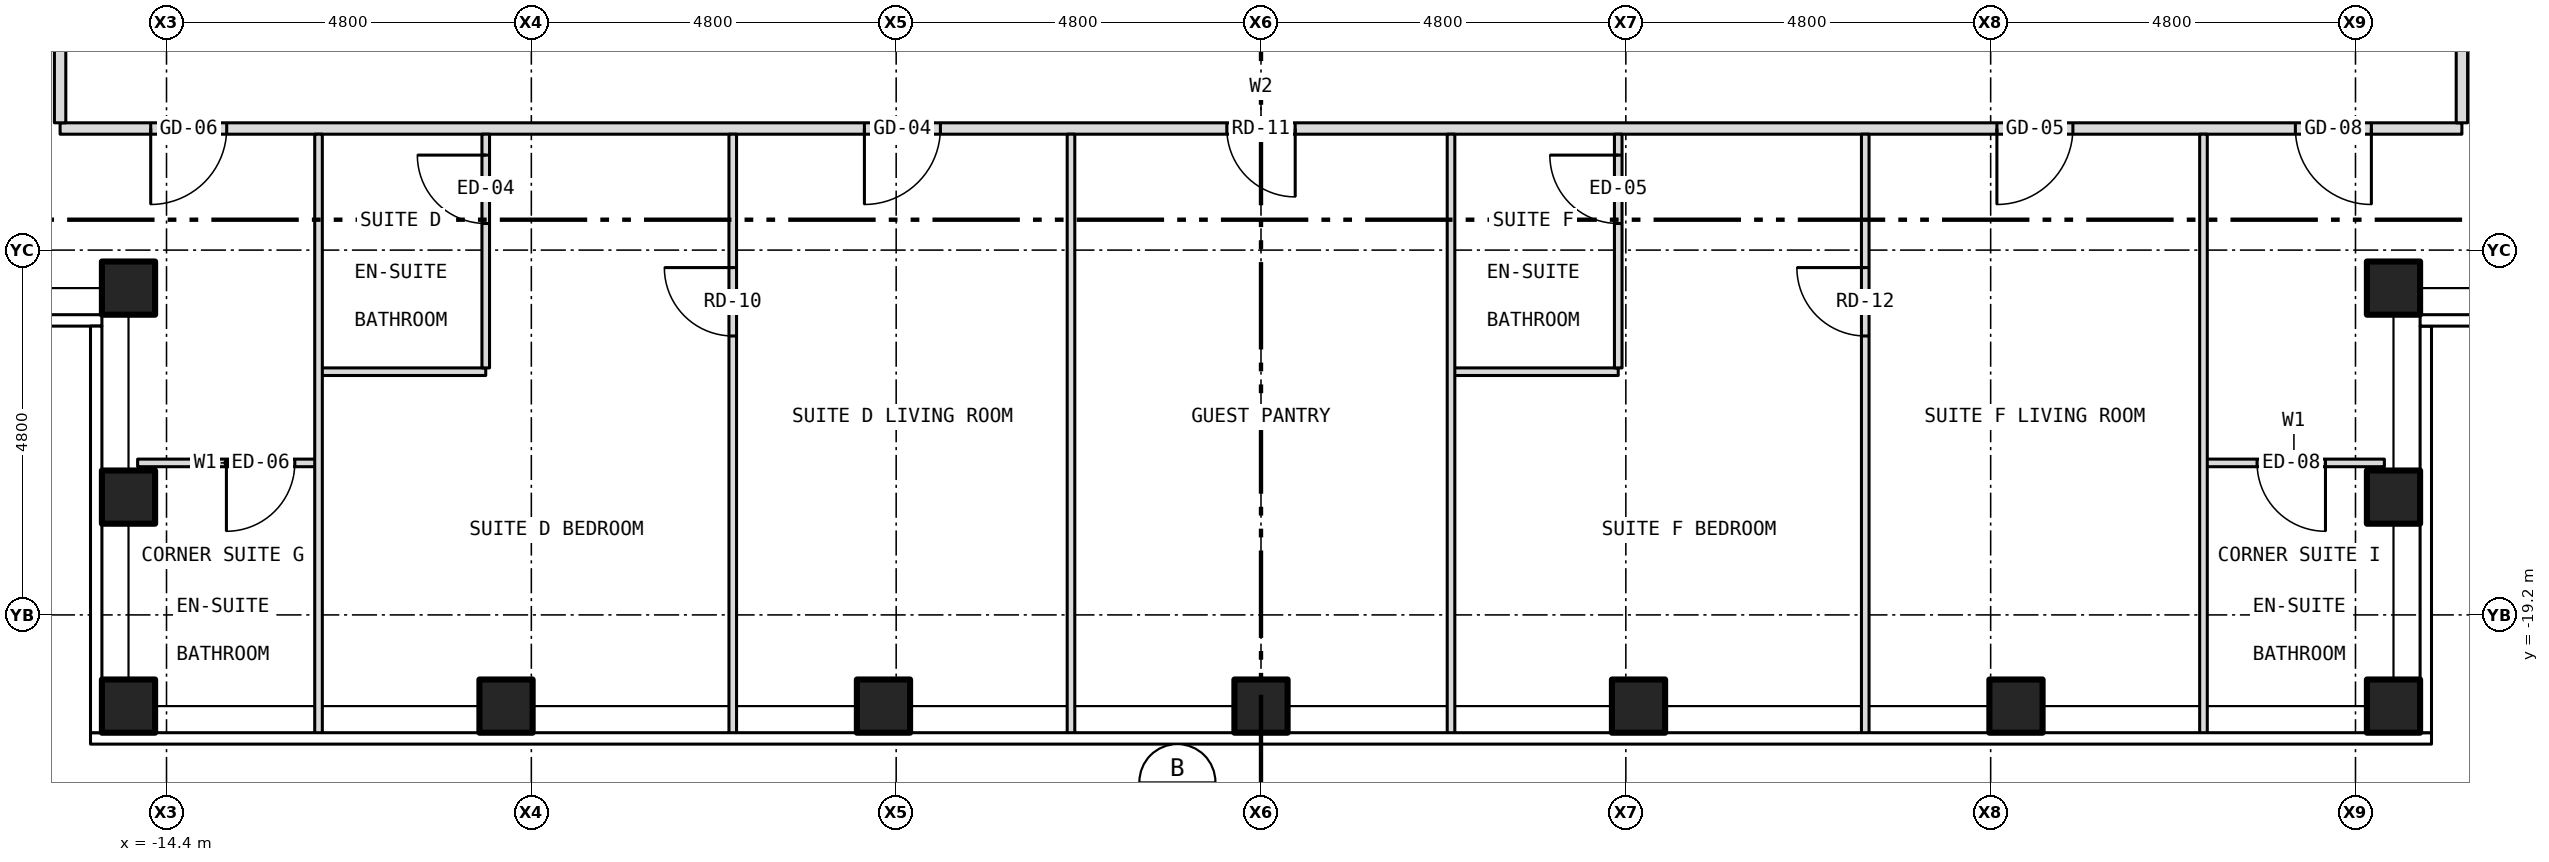
"""IFC4 building model, lengths in metres.
Left out: names, types, materials, properties, quantities, classifications, styles, units other than length and angle.
Written with IfcOpenShell. Run it as: python <this file> out.ifc"""

import sys

from ifc_helpers import new_model, si_unit, direction, frame, frame_2d, origin, origin_2d, place, context, subcontext, project, spatial, rectangle, hollow_rectangle, extrude, element, fill, save


model = new_model("IFC4")
c1 = context("Model", 3, precision=1e-05, world=origin(), true_north=direction((0.0, 1.0)))
c2 = subcontext(c1, "Body", "Model", "MODEL_VIEW")
j1 = project(units=[si_unit("LENGTHUNIT", "METRE"), si_unit("PLANEANGLEUNIT", "RADIAN")], contexts=[c1])
p1 = place(None, origin())
s1 = spatial("IfcSite", under=j1, at=p1, CompositionType="ELEMENT")
p2 = place(p1, origin())
s2 = spatial("IfcBuilding", under=s1, at=p2, CompositionType="ELEMENT")
p3 = place(p2, frame((0.0, 0.0, 194.5)))
s3 = spatial("IfcBuildingStorey", under=s2, at=p3, CompositionType="ELEMENT", Elevation=194.5)
for number, where, z_axis, x_axis in (
    (1, (-14.9, -20.4, -0.15), (0.0, 0.0, 1.0), (1.0, 0.0, 0.0)),
    (2, (-9.933, -20.4, -0.15), (0.0, 0.0, 1.0), (1.0, 0.0, 0.0)),
    (3, (-4.967, -20.4, -0.15), (0.0, 0.0, 1.0), (1.0, 0.0, 0.0)),
    (4, (0.0, -20.4, -0.15), (0.0, 0.0, 1.0), (1.0, 0.0, 0.0)),
    (5, (4.967, -20.4, -0.15), (0.0, 0.0, 1.0), (1.0, 0.0, 0.0)),
    (6, (9.933, -20.4, -0.15), (0.0, 0.0, 1.0), (1.0, 0.0, 0.0)),
    (7, (14.9, -20.4, -0.15), (0.0, 0.0, 1.0), (1.0, 0.0, 0.0)),
    (8, (-14.9, -14.9, -0.15), (0.0, 0.0, 1.0), (1.0, 0.0, 0.0)),
    (9, (-14.9, -17.65, -0.15), (0.0, 0.0, 1.0), (1.0, 0.0, 0.0)),
    (10, (14.9, -14.9, -0.15), (0.0, 0.0, 1.0), (1.0, 0.0, 0.0)),
    (11, (14.9, -17.65, -0.15), (0.0, 0.0, 1.0), (1.0, 0.0, 0.0)),
):
    element("IfcColumn", number, at=place(p3, frame(where, z_axis=z_axis, x_axis=x_axis)), inside=s3, PredefinedType="COLUMN", context=c2, shape_type="SweptSolid", body=[
        extrude(hollow_rectangle(XDim=0.7, YDim=0.7, WallThickness=0.04, at=origin_2d()), origin(), (0.0, 0.0, 1.0), 3.5),
    ])
p4 = place(p3, frame((-14.78, -17.2, 0.0), z_axis=(0.0, 0.0, 1.0), x_axis=(1.0, 0.0, 0.0)))
e12 = element("IfcWall", 12, at=p4, inside=s3, PredefinedType="PARTITIONING", context=c2, shape_type="SweptSolid", body=[
    extrude(rectangle(XDim=2.38, YDim=0.1, at=frame_2d((1.19, 0.0))), origin(), (0.0, 0.0, 1.0), 3.35),
])
p5 = place(p4, frame((1.168, 0.0, 0.0)))
e13 = element("IfcOpeningElement", 13, at=p5, cuts=e12, PredefinedType="OPENING", context=c2, shape_type="SweptSolid", body=[
    extrude(rectangle(XDim=0.9, YDim=2.1, at=frame_2d((0.45, 1.05))), frame((0.0, 0.062, 0.0), z_axis=(0.0, -1.0, 0.0), x_axis=(1.0, 0.0, 0.0)), (0.0, 0.0, 1.0), 0.124),
])
p6 = place(p3, frame((12.4, -17.2, 0.0), z_axis=(0.0, 0.0, 1.0), x_axis=(1.0, 0.0, 0.0)))
e14 = element("IfcWall", 14, at=p6, inside=s3, PredefinedType="PARTITIONING", context=c2, shape_type="SweptSolid", body=[
    extrude(rectangle(XDim=2.38, YDim=0.1, at=frame_2d((1.19, 0.0))), origin(), (0.0, 0.0, 1.0), 3.35),
])
p7 = place(p6, frame((0.705, 0.0, 0.0)))
e15 = element("IfcOpeningElement", 15, at=p7, cuts=e14, PredefinedType="OPENING", context=c2, shape_type="SweptSolid", body=[
    extrude(rectangle(XDim=0.9, YDim=2.1, at=frame_2d((0.45, 1.05))), frame((0.0, 0.062, 0.0), z_axis=(0.0, -1.0, 0.0), x_axis=(1.0, 0.0, 0.0)), (0.0, 0.0, 1.0), 0.124),
])
for number, where, z_axis, x_axis in (
    (16, (-12.4, -16.0, 0.0), (0.0, 0.0, 1.0), (1.0, 0.0, 0.0)),
    (17, (2.5, -16.0, 0.0), (0.0, 0.0, 1.0), (1.0, 0.0, 0.0)),
):
    element("IfcWall", number, at=place(p3, frame(where, z_axis=z_axis, x_axis=x_axis)), inside=s3, PredefinedType="PARTITIONING", context=c2, shape_type="SweptSolid", body=[
        extrude(rectangle(XDim=2.2, YDim=0.1, at=frame_2d((1.1, 0.0))), origin(), (0.0, 0.0, 1.0), 3.35),
    ])
p8 = place(p3, frame((-15.8, -12.8, 0.0), z_axis=(0.0, 0.0, 1.0), x_axis=(1.0, 0.0, 0.0)))
e18 = element("IfcWall", 18, at=p8, inside=s3, PredefinedType="PARTITIONING", context=c2, shape_type="SweptSolid", body=[
    extrude(rectangle(XDim=31.6, YDim=0.15, at=frame_2d((15.8, 0.0))), origin(), (0.0, 0.0, 1.0), 3.35),
])
p9 = place(p8, frame((10.582, 0.0, 0.0)))
e19 = element("IfcOpeningElement", 19, at=p9, cuts=e18, PredefinedType="OPENING", context=c2, shape_type="SweptSolid", body=[
    extrude(rectangle(XDim=1.0, YDim=2.1, at=frame_2d((0.5, 1.05))), frame((0.0, 0.087, 0.0), z_axis=(0.0, -1.0, 0.0), x_axis=(1.0, 0.0, 0.0)), (0.0, 0.0, 1.0), 0.174),
])
p10 = place(p8, frame((15.35, 0.0, 0.0)))
e20 = element("IfcOpeningElement", 20, at=p10, cuts=e18, PredefinedType="OPENING", context=c2, shape_type="SweptSolid", body=[
    extrude(rectangle(XDim=0.9, YDim=2.1, at=frame_2d((0.45, 1.05))), frame((0.0, 0.087, 0.0), z_axis=(0.0, -1.0, 0.0), x_axis=(1.0, 0.0, 0.0)), (0.0, 0.0, 1.0), 0.174),
])
p11 = place(p8, frame((25.482, 0.0, 0.0)))
e21 = element("IfcOpeningElement", 21, at=p11, cuts=e18, PredefinedType="OPENING", context=c2, shape_type="SweptSolid", body=[
    extrude(rectangle(XDim=1.0, YDim=2.1, at=frame_2d((0.5, 1.05))), frame((0.0, 0.087, 0.0), z_axis=(0.0, -1.0, 0.0), x_axis=(1.0, 0.0, 0.0)), (0.0, 0.0, 1.0), 0.174),
])
p12 = place(p8, frame((1.192, 0.0, 0.0)))
e22 = element("IfcOpeningElement", 22, at=p12, cuts=e18, PredefinedType="OPENING", context=c2, shape_type="SweptSolid", body=[
    extrude(rectangle(XDim=1.0, YDim=2.1, at=frame_2d((0.5, 1.05))), frame((0.0, 0.087, 0.0), z_axis=(0.0, -1.0, 0.0), x_axis=(1.0, 0.0, 0.0)), (0.0, 0.0, 1.0), 0.174),
])
p13 = place(p8, frame((29.409, 0.0, 0.0)))
e23 = element("IfcOpeningElement", 23, at=p13, cuts=e18, PredefinedType="OPENING", context=c2, shape_type="SweptSolid", body=[
    extrude(rectangle(XDim=1.0, YDim=2.1, at=frame_2d((0.5, 1.05))), frame((0.0, 0.087, 0.0), z_axis=(0.0, -1.0, 0.0), x_axis=(1.0, 0.0, 0.0)), (0.0, 0.0, 1.0), 0.174),
])
p14 = place(p3, frame((-15.8, -12.725, 0.0), z_axis=(0.0, 0.0, 1.0), x_axis=(0.0, 1.0, 0.0)))
e24 = element("IfcWall", 24, at=p14, inside=s3, PredefinedType="PARTITIONING", context=c2, shape_type="SweptSolid", body=[
    extrude(rectangle(XDim=1.805, YDim=0.15, at=frame_2d((0.903, 0.0))), origin(), (0.0, 0.0, 1.0), 3.35),
])
p15 = place(p3, frame((-12.4, -20.78, 0.0), z_axis=(0.0, 0.0, 1.0), x_axis=(0.0, 1.0, 0.0)))
e25 = element("IfcWall", 25, at=p15, inside=s3, PredefinedType="PARTITIONING", context=c2, shape_type="SweptSolid", body=[
    extrude(rectangle(XDim=7.905, YDim=0.1, at=frame_2d((3.953, 0.0))), origin(), (0.0, 0.0, 1.0), 3.35),
])
p16 = place(p3, frame((-10.2, -15.95, 0.0), z_axis=(0.0, 0.0, 1.0), x_axis=(0.0, 1.0, 0.0)))
e26 = element("IfcWall", 26, at=p16, inside=s3, PredefinedType="PARTITIONING", context=c2, shape_type="SweptSolid", body=[
    extrude(rectangle(XDim=3.075, YDim=0.1, at=frame_2d((1.538, 0.0))), origin(), (0.0, 0.0, 1.0), 3.35),
])
p17 = place(p16, frame((1.9, 0.0, 0.0)))
e27 = element("IfcOpeningElement", 27, at=p17, cuts=e26, PredefinedType="OPENING", context=c2, shape_type="SweptSolid", body=[
    extrude(rectangle(XDim=0.9, YDim=2.1, at=frame_2d((0.45, 1.05))), frame((0.0, 0.062, 0.0), z_axis=(0.0, -1.0, 0.0), x_axis=(1.0, 0.0, 0.0)), (0.0, 0.0, 1.0), 0.124),
])
p18 = place(p3, frame((-6.95, -20.78, 0.0), z_axis=(0.0, 0.0, 1.0), x_axis=(0.0, 1.0, 0.0)))
e28 = element("IfcWall", 28, at=p18, inside=s3, PredefinedType="PARTITIONING", context=c2, shape_type="SweptSolid", body=[
    extrude(rectangle(XDim=7.905, YDim=0.1, at=frame_2d((3.953, 0.0))), origin(), (0.0, 0.0, 1.0), 3.35),
])
p19 = place(p18, frame((5.25, 0.0, 0.0)))
e29 = element("IfcOpeningElement", 29, at=p19, cuts=e28, PredefinedType="OPENING", context=c2, shape_type="SweptSolid", body=[
    extrude(rectangle(XDim=0.9, YDim=2.1, at=frame_2d((0.45, 1.05))), frame((0.0, 0.062, 0.0), z_axis=(0.0, -1.0, 0.0), x_axis=(1.0, 0.0, 0.0)), (0.0, 0.0, 1.0), 0.124),
])
for number, where, z_axis, x_axis in (
    (30, (-2.5, -20.78, 0.0), (0.0, 0.0, 1.0), (0.0, 1.0, 0.0)),
    (31, (2.5, -20.78, 0.0), (0.0, 0.0, 1.0), (0.0, 1.0, 0.0)),
):
    element("IfcWall", number, at=place(p3, frame(where, z_axis=z_axis, x_axis=x_axis)), inside=s3, PredefinedType="PARTITIONING", context=c2, shape_type="SweptSolid", body=[
        extrude(rectangle(XDim=7.905, YDim=0.1, at=frame_2d((3.953, 0.0))), origin(), (0.0, 0.0, 1.0), 3.35),
    ])
p20 = place(p3, frame((4.7, -15.95, 0.0), z_axis=(0.0, 0.0, 1.0), x_axis=(0.0, 1.0, 0.0)))
e32 = element("IfcWall", 32, at=p20, inside=s3, PredefinedType="PARTITIONING", context=c2, shape_type="SweptSolid", body=[
    extrude(rectangle(XDim=3.075, YDim=0.1, at=frame_2d((1.538, 0.0))), origin(), (0.0, 0.0, 1.0), 2.817),
])
p21 = place(p20, frame((1.9, 0.0, 0.0)))
e33 = element("IfcOpeningElement", 33, at=p21, cuts=e32, PredefinedType="OPENING", context=c2, shape_type="SweptSolid", body=[
    extrude(rectangle(XDim=0.9, YDim=2.1, at=frame_2d((0.45, 1.05))), frame((0.0, 0.062, 0.0), z_axis=(0.0, -1.0, 0.0), x_axis=(1.0, 0.0, 0.0)), (0.0, 0.0, 1.0), 0.124),
])
p22 = place(p3, frame((7.95, -20.78, 0.0), z_axis=(0.0, 0.0, 1.0), x_axis=(0.0, 1.0, 0.0)))
e34 = element("IfcWall", 34, at=p22, inside=s3, PredefinedType="PARTITIONING", context=c2, shape_type="SweptSolid", body=[
    extrude(rectangle(XDim=7.905, YDim=0.1, at=frame_2d((3.953, 0.0))), origin(), (0.0, 0.0, 1.0), 3.35),
])
p23 = place(p22, frame((5.25, 0.0, 0.0)))
e35 = element("IfcOpeningElement", 35, at=p23, cuts=e34, PredefinedType="OPENING", context=c2, shape_type="SweptSolid", body=[
    extrude(rectangle(XDim=0.9, YDim=2.1, at=frame_2d((0.45, 1.05))), frame((0.0, 0.062, 0.0), z_axis=(0.0, -1.0, 0.0), x_axis=(1.0, 0.0, 0.0)), (0.0, 0.0, 1.0), 0.124),
])
p24 = place(p3, frame((12.4, -20.78, 0.0), z_axis=(0.0, 0.0, 1.0), x_axis=(0.0, 1.0, 0.0)))
e36 = element("IfcWall", 36, at=p24, inside=s3, PredefinedType="PARTITIONING", context=c2, shape_type="SweptSolid", body=[
    extrude(rectangle(XDim=7.905, YDim=0.1, at=frame_2d((3.953, 0.0))), origin(), (0.0, 0.0, 1.0), 3.35),
])
p25 = place(p3, frame((15.8, -12.725, 0.0), z_axis=(0.0, 0.0, 1.0), x_axis=(0.0, 1.0, 0.0)))
e37 = element("IfcWall", 37, at=p25, inside=s3, PredefinedType="PARTITIONING", context=c2, shape_type="SweptSolid", body=[
    extrude(rectangle(XDim=1.805, YDim=0.15, at=frame_2d((0.903, 0.0))), origin(), (0.0, 0.0, 1.0), 3.35),
])
p26 = place(p9, origin())
e38 = element("IfcDoor", 38, at=p26, inside=s3, OperationType="SINGLE_SWING_LEFT", PredefinedType="DOOR", context=c2, shape_type="SweptSolid", body=[
    extrude(rectangle(XDim=1.0, YDim=2.1, at=frame_2d((0.5, 1.05))), frame((0.0, 0.025, 0.0), z_axis=(0.0, -1.0, 0.0), x_axis=(1.0, 0.0, 0.0)), (0.0, 0.0, 1.0), 0.05),
])
fill(e19, e38)
p27 = place(p19, origin())
e39 = element("IfcDoor", 39, at=p27, inside=s3, OperationType="SINGLE_SWING_RIGHT", PredefinedType="DOOR", context=c2, shape_type="SweptSolid", body=[
    extrude(rectangle(XDim=0.9, YDim=2.1, at=frame_2d((0.45, 1.05))), frame((0.0, 0.025, 0.0), z_axis=(0.0, -1.0, 0.0), x_axis=(1.0, 0.0, 0.0)), (0.0, 0.0, 1.0), 0.05),
])
fill(e29, e39)
p28 = place(p17, origin())
e40 = element("IfcDoor", 40, at=p28, inside=s3, OperationType="SINGLE_SWING_RIGHT", PredefinedType="DOOR", context=c2, shape_type="SweptSolid", body=[
    extrude(rectangle(XDim=0.9, YDim=2.1, at=frame_2d((0.45, 1.05))), frame((0.0, 0.025, 0.0), z_axis=(0.0, -1.0, 0.0), x_axis=(1.0, 0.0, 0.0)), (0.0, 0.0, 1.0), 0.05),
])
fill(e27, e40)
p29 = place(p10, origin())
e41 = element("IfcDoor", 41, at=p29, inside=s3, OperationType="SINGLE_SWING_RIGHT", PredefinedType="DOOR", context=c2, shape_type="SweptSolid", body=[
    extrude(rectangle(XDim=0.9, YDim=2.1, at=frame_2d((0.45, 1.05))), frame((0.0, 0.025, 0.0), z_axis=(0.0, -1.0, 0.0), x_axis=(1.0, 0.0, 0.0)), (0.0, 0.0, 1.0), 0.05),
])
fill(e20, e41)
p30 = place(p11, origin())
e42 = element("IfcDoor", 42, at=p30, inside=s3, OperationType="SINGLE_SWING_LEFT", PredefinedType="DOOR", context=c2, shape_type="SweptSolid", body=[
    extrude(rectangle(XDim=1.0, YDim=2.1, at=frame_2d((0.5, 1.05))), frame((0.0, 0.025, 0.0), z_axis=(0.0, -1.0, 0.0), x_axis=(1.0, 0.0, 0.0)), (0.0, 0.0, 1.0), 0.05),
])
fill(e21, e42)
p31 = place(p23, origin())
e43 = element("IfcDoor", 43, at=p31, inside=s3, OperationType="SINGLE_SWING_RIGHT", PredefinedType="DOOR", context=c2, shape_type="SweptSolid", body=[
    extrude(rectangle(XDim=0.9, YDim=2.1, at=frame_2d((0.45, 1.05))), frame((0.0, 0.025, 0.0), z_axis=(0.0, -1.0, 0.0), x_axis=(1.0, 0.0, 0.0)), (0.0, 0.0, 1.0), 0.05),
])
fill(e35, e43)
p32 = place(p21, origin())
e44 = element("IfcDoor", 44, at=p32, inside=s3, OperationType="SINGLE_SWING_RIGHT", PredefinedType="DOOR", context=c2, shape_type="SweptSolid", body=[
    extrude(rectangle(XDim=0.9, YDim=2.1, at=frame_2d((0.45, 1.05))), frame((0.0, 0.025, 0.0), z_axis=(0.0, -1.0, 0.0), x_axis=(1.0, 0.0, 0.0)), (0.0, 0.0, 1.0), 0.05),
])
fill(e33, e44)
p33 = place(p5, origin())
e45 = element("IfcDoor", 45, at=p33, inside=s3, OperationType="SINGLE_SWING_LEFT", PredefinedType="DOOR", context=c2, shape_type="SweptSolid", body=[
    extrude(rectangle(XDim=0.9, YDim=2.1, at=frame_2d((0.45, 1.05))), frame((0.0, 0.025, 0.0), z_axis=(0.0, -1.0, 0.0), x_axis=(1.0, 0.0, 0.0)), (0.0, 0.0, 1.0), 0.05),
])
fill(e13, e45)
p34 = place(p12, origin())
e46 = element("IfcDoor", 46, at=p34, inside=s3, OperationType="SINGLE_SWING_LEFT", PredefinedType="DOOR", context=c2, shape_type="SweptSolid", body=[
    extrude(rectangle(XDim=1.0, YDim=2.1, at=frame_2d((0.5, 1.05))), frame((0.0, 0.025, 0.0), z_axis=(0.0, -1.0, 0.0), x_axis=(1.0, 0.0, 0.0)), (0.0, 0.0, 1.0), 0.05),
])
fill(e22, e46)
p35 = place(p7, origin())
e47 = element("IfcDoor", 47, at=p35, inside=s3, OperationType="SINGLE_SWING_RIGHT", PredefinedType="DOOR", context=c2, shape_type="SweptSolid", body=[
    extrude(rectangle(XDim=0.9, YDim=2.1, at=frame_2d((0.45, 1.05))), frame((0.0, 0.025, 0.0), z_axis=(0.0, -1.0, 0.0), x_axis=(1.0, 0.0, 0.0)), (0.0, 0.0, 1.0), 0.05),
])
fill(e15, e47)
p36 = place(p13, origin())
e48 = element("IfcDoor", 48, at=p36, inside=s3, OperationType="SINGLE_SWING_RIGHT", PredefinedType="DOOR", context=c2, shape_type="SweptSolid", body=[
    extrude(rectangle(XDim=1.0, YDim=2.1, at=frame_2d((0.5, 1.05))), frame((0.0, 0.025, 0.0), z_axis=(0.0, -1.0, 0.0), x_axis=(1.0, 0.0, 0.0)), (0.0, 0.0, 1.0), 0.05),
])
fill(e23, e48)
save(model, sys.argv[1])
